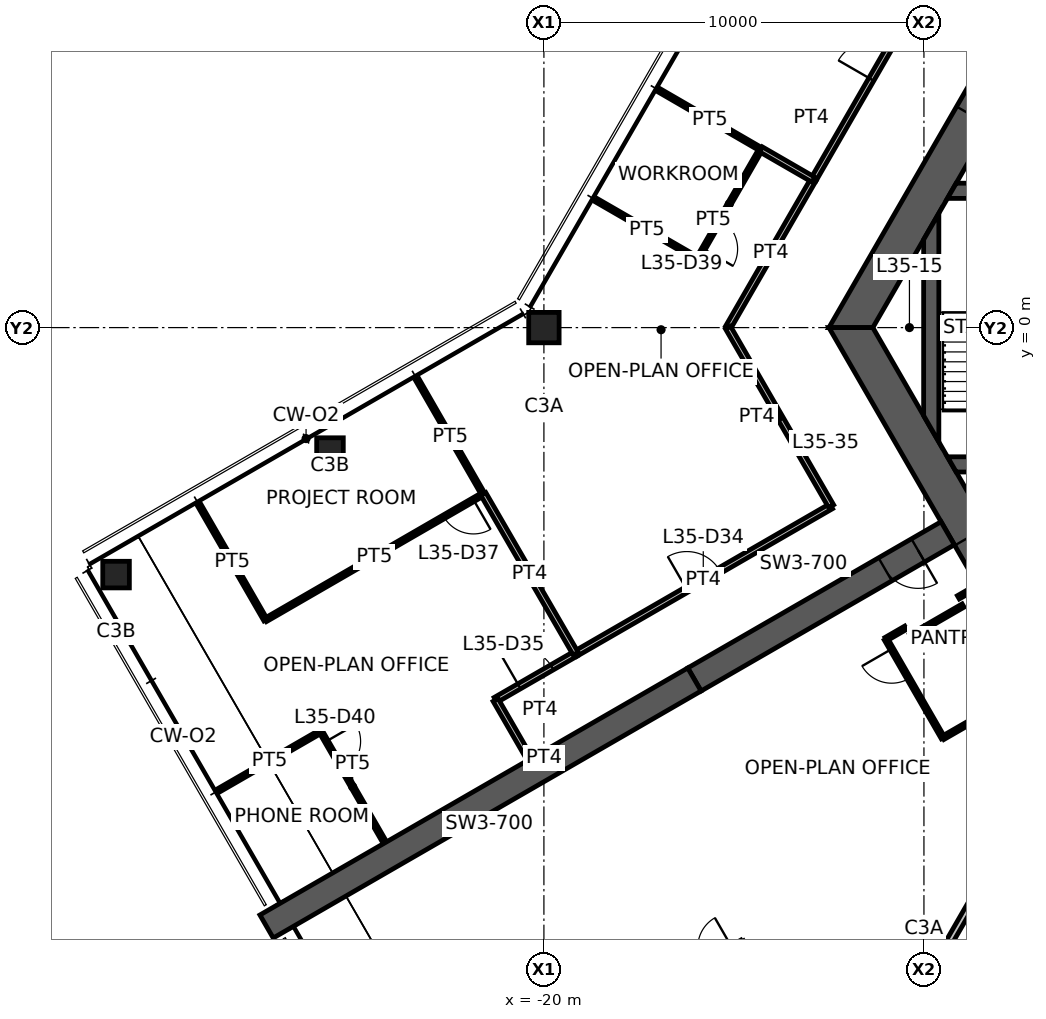
"""IFC4 building model, lengths in metres.
Left out: names, types, materials, properties, quantities, classifications, styles, units other than length and angle.
Written with IfcOpenShell. Run it as: python <this file> out.ifc"""

import sys

from ifc_helpers import new_model, si_unit, direction, frame, frame_2d, origin, origin_2d, place, context, subcontext, project, spatial, polyline, rectangle, hollow_rectangle, outline, extrude, element, fill, save


model = new_model("IFC4")
c1 = context("Model", 3, precision=1e-05, world=origin(), true_north=direction((0.0, 1.0)))
c2 = subcontext(c1, "Body", "Model", "MODEL_VIEW")
j1 = project(units=[si_unit("LENGTHUNIT", "METRE"), si_unit("PLANEANGLEUNIT", "RADIAN")], contexts=[c1])
p1 = place(None, origin())
s1 = spatial("IfcSite", under=j1, at=p1, CompositionType="ELEMENT")
p2 = place(p1, origin())
s2 = spatial("IfcBuilding", under=s1, at=p2, CompositionType="ELEMENT")
p3 = place(p2, frame((0.0, 0.0, 140.9)))
s3 = spatial("IfcBuildingStorey", under=s2, at=p3, CompositionType="ELEMENT", Elevation=140.9)
p4 = place(p3, frame((-20.0, 0.0, 0.0), z_axis=(0.0, 0.0, 1.0), x_axis=(1.0, 0.0, 0.0)))
e1 = element("IfcColumn", 1, at=p4, inside=s3, PredefinedType="COLUMN", context=c2, shape_type="SweptSolid", body=[
    extrude(hollow_rectangle(XDim=0.8, YDim=0.8, WallThickness=0.045, at=origin_2d()), origin(), (0.0, 0.0, 1.0), 3.9),
])
for number, where, z_axis, x_axis in (
    (2, (-25.629, -3.25, 0.0), (0.0, 0.0, 1.0), (1.0, 0.0, 0.0)),
    (3, (-31.258, -6.5, 0.0), (0.0, 0.0, 1.0), (1.0, 0.0, 0.0)),
):
    element("IfcColumn", number, at=place(p3, frame(where, z_axis=z_axis, x_axis=x_axis)), inside=s3, PredefinedType="COLUMN", context=c2, shape_type="SweptSolid", body=[
        extrude(hollow_rectangle(XDim=0.7, YDim=0.7, WallThickness=0.036, at=origin_2d()), origin(), (0.0, 0.0, 1.0), 3.9),
    ])
p5 = place(p3, frame((-5.961, 10.325, 0.0), z_axis=(0.0, 0.0, 1.0), x_axis=(-0.500004296715, -0.866022923061, 0.0)))
e4 = element("IfcWall", 4, at=p5, inside=s3, PredefinedType="SHEAR", context=c2, shape_type="SweptSolid", body=[
    extrude(outline(polyline([(-0.289, -0.5), (4.494, -0.5), (5.494, -0.5), (12.211, -0.5), (11.634, 0.5), (5.494, 0.5), (4.494, 0.5), (0.289, 0.5), (-0.289, -0.5)])), origin(), (0.0, 0.0, 1.0), 3.9),
])
p6 = place(p5, frame((4.494, 0.0, 0.0)))
e5 = element("IfcOpeningElement", 5, at=p6, cuts=e4, PredefinedType="OPENING", context=c2, shape_type="SweptSolid", body=[
    extrude(rectangle(XDim=1.0, YDim=2.1, at=frame_2d((0.5, 1.05))), frame((0.0, 0.51, 0.0), z_axis=(0.0, -1.0, 0.0), x_axis=(1.0, 0.0, 0.0)), (0.0, 0.0, 1.0), 1.02),
])
p7 = place(p3, frame((-11.922, 0.0, 0.0), z_axis=(0.0, 0.0, 1.0), x_axis=(0.500004296715, -0.866022923061, 0.0)))
e6 = element("IfcWall", 6, at=p7, inside=s3, PredefinedType="SHEAR", context=c2, shape_type="SweptSolid", body=[
    extrude(outline(polyline([(-0.289, -0.5), (6.331, -0.5), (7.131, -0.5), (12.211, -0.5), (11.634, 0.5), (7.131, 0.5), (6.331, 0.5), (0.289, 0.5), (-0.289, -0.5)])), origin(), (0.0, 0.0, 1.0), 3.9),
])
p8 = place(p7, frame((6.331, 0.0, 0.0)))
e7 = element("IfcOpeningElement", 7, at=p8, cuts=e6, PredefinedType="OPENING", context=c2, shape_type="SweptSolid", body=[
    extrude(rectangle(XDim=0.8, YDim=2.1, at=frame_2d((0.4, 1.05))), frame((0.0, 0.51, 0.0), z_axis=(0.0, -1.0, 0.0), x_axis=(1.0, 0.0, 0.0)), (0.0, 0.0, 1.0), 1.02),
])
p9 = place(p3, frame((-9.375, -5.413, 0.0), z_axis=(0.0, 0.0, 1.0), x_axis=(-0.866032377459, -0.499987921047, 0.0)))
e8 = element("IfcWall", 8, at=p9, inside=s3, PredefinedType="SHEAR", context=c2, shape_type="SweptSolid", body=[
    extrude(rectangle(XDim=7.696, YDim=0.7, at=frame_2d((3.848, 0.0))), origin(), (0.0, 0.0, 1.0), 3.9),
])
p10 = place(p9, frame((0.9, 0.0, 0.0)))
e9 = element("IfcOpeningElement", 9, at=p10, cuts=e8, PredefinedType="OPENING", context=c2, shape_type="SweptSolid", body=[
    extrude(rectangle(XDim=1.0, YDim=2.1, at=frame_2d((0.5, 1.05))), frame((0.0, 0.36, 0.0), z_axis=(0.0, -1.0, 0.0), x_axis=(1.0, 0.0, 0.0)), (0.0, 0.0, 1.0), 0.72),
])
p11 = place(p3, frame((-16.039, -9.26, 0.0), z_axis=(0.0, 0.0, 1.0), x_axis=(-0.866024837091, -0.50000098154, 0.0)))
e10 = element("IfcWall", 10, at=p11, inside=s3, PredefinedType="SHEAR", context=c2, shape_type="SweptSolid", body=[
    extrude(rectangle(XDim=13.0, YDim=0.7, at=frame_2d((6.5, 0.0))), origin(), (0.0, 0.0, 1.0), 3.9),
])
p12 = place(p3, frame((-9.266, 3.6, 0.0), z_axis=(0.0, 0.0, 1.0), x_axis=(1.0, 0.0, 0.0)))
e11 = element("IfcWall", 11, at=p12, inside=s3, PredefinedType="SHEAR", context=c2, shape_type="SweptSolid", body=[
    extrude(outline(polyline([(-0.115, -0.2), (3.266, -0.2), (4.266, -0.2), (5.667, -0.2), (6.767, -0.2), (7.866, -0.2), (7.866, 0.2), (6.767, 0.2), (5.667, 0.2), (4.266, 0.2), (3.266, 0.2), (0.115, 0.2), (-0.115, -0.2)])), origin(), (0.0, 0.0, 1.0), 3.9),
])
p13 = place(p12, frame((3.266, 0.0, 0.0)))
e12 = element("IfcOpeningElement", 12, at=p13, cuts=e11, PredefinedType="OPENING", context=c2, shape_type="SweptSolid", body=[
    extrude(rectangle(XDim=1.0, YDim=2.1, at=frame_2d((0.5, 1.05))), frame((0.0, 0.21, 0.0), z_axis=(0.0, -1.0, 0.0), x_axis=(1.0, 0.0, 0.0)), (0.0, 0.0, 1.0), 0.42),
])
p14 = place(p12, frame((5.667, 0.0, 0.0)))
e13 = element("IfcOpeningElement", 13, at=p14, cuts=e11, PredefinedType="OPENING", context=c2, shape_type="SweptSolid", body=[
    extrude(rectangle(XDim=1.1, YDim=2.1, at=frame_2d((0.55, 1.05))), frame((0.0, 0.21, 0.0), z_axis=(0.0, -1.0, 0.0), x_axis=(1.0, 0.0, 0.0)), (0.0, 0.0, 1.0), 0.42),
])
p15 = place(p3, frame((-9.266, -3.6, 0.0), z_axis=(0.0, 0.0, 1.0), x_axis=(1.0, 0.0, 0.0)))
e14 = element("IfcWall", 14, at=p15, inside=s3, PredefinedType="SHEAR", context=c2, shape_type="SweptSolid", body=[
    extrude(outline(polyline([(0.115, -0.2), (3.116, -0.2), (4.417, -0.2), (5.667, -0.2), (6.767, -0.2), (7.866, -0.2), (7.866, 0.2), (6.767, 0.2), (5.667, 0.2), (4.417, 0.2), (3.116, 0.2), (-0.115, 0.2), (0.115, -0.2)])), origin(), (0.0, 0.0, 1.0), 3.9),
])
p16 = place(p15, frame((5.667, 0.0, 0.0)))
e15 = element("IfcOpeningElement", 15, at=p16, cuts=e14, PredefinedType="OPENING", context=c2, shape_type="SweptSolid", body=[
    extrude(rectangle(XDim=1.1, YDim=2.1, at=frame_2d((0.55, 1.05))), frame((0.0, 0.21, 0.0), z_axis=(0.0, -1.0, 0.0), x_axis=(1.0, 0.0, 0.0)), (0.0, 0.0, 1.0), 0.42),
])
p17 = place(p15, frame((3.116, 0.0, 0.0)))
e16 = element("IfcOpeningElement", 16, at=p17, cuts=e14, PredefinedType="OPENING", context=c2, shape_type="SweptSolid", body=[
    extrude(rectangle(XDim=1.3, YDim=2.1, at=frame_2d((0.65, 1.05))), frame((0.0, 0.21, 0.0), z_axis=(0.0, -1.0, 0.0), x_axis=(1.0, 0.0, 0.0)), (0.0, 0.0, 1.0), 0.42),
])
p18 = place(p3, frame((-9.808, -2.662, 0.0), z_axis=(0.0, 0.0, 1.0), x_axis=(0.0, 1.0, 0.0)))
e17 = element("IfcWall", 17, at=p18, inside=s3, PredefinedType="SHEAR", context=c2, shape_type="SweptSolid", body=[
    extrude(outline(polyline([(-0.346, -0.2), (5.671, -0.2), (4.978, 0.2), (0.346, 0.2), (-0.346, -0.2)])), origin(), (0.0, 0.0, 1.0), 3.9),
])
p19 = place(p3, frame((-6.035, -10.453, 0.0), z_axis=(0.0, 0.0, 1.0), x_axis=(-0.499989830942, -0.866031274813, 0.0)))
e18 = element("IfcWall", 18, at=p19, inside=s3, PredefinedType="PARTITIONING", context=c2, shape_type="SweptSolid", body=[
    extrude(rectangle(XDim=7.93, YDim=0.175, at=frame_2d((3.965, 0.0))), origin(), (0.0, 0.0, 1.0), 3.05),
])
p20 = place(p19, frame((1.13, 0.0, 0.0)))
e19 = element("IfcOpeningElement", 19, at=p20, cuts=e18, PredefinedType="OPENING", context=c2, shape_type="SweptSolid", body=[
    extrude(rectangle(XDim=1.0, YDim=2.1, at=frame_2d((0.5, 1.05))), frame((0.0, 0.098, 0.0), z_axis=(0.0, -1.0, 0.0), x_axis=(1.0, 0.0, 0.0)), (0.0, 0.0, 1.0), 0.195),
])
p21 = place(p3, frame((-19.171, -8.586, 0.0), z_axis=(0.0, 0.0, 1.0), x_axis=(0.866007176269, 0.500031569654, 0.0)))
e20 = element("IfcWall", 20, at=p21, inside=s3, PredefinedType="PARTITIONING", context=c2, shape_type="SweptSolid", body=[
    extrude(rectangle(XDim=7.771, YDim=0.15, at=frame_2d((3.885, 0.0))), origin(), (0.0, 0.0, 1.0), 2.95),
])
p22 = place(p21, frame((3.385, 0.0, 0.0)))
e21 = element("IfcOpeningElement", 21, at=p22, cuts=e20, PredefinedType="OPENING", context=c2, shape_type="SweptSolid", body=[
    extrude(rectangle(XDim=1.0, YDim=2.1, at=frame_2d((0.5, 1.05))), frame((0.0, 0.085, 0.0), z_axis=(0.0, -1.0, 0.0), x_axis=(1.0, 0.0, 0.0)), (0.0, 0.0, 1.0), 0.17),
])
p23 = place(p3, frame((-15.156, 0.0, 0.0), z_axis=(0.0, 0.0, 1.0), x_axis=(0.500014848696, 0.866016830716, 0.0)))
e22 = element("IfcWall", 22, at=p23, inside=s3, PredefinedType="PARTITIONING", context=c2, shape_type="SweptSolid", body=[
    extrude(rectangle(XDim=4.505, YDim=0.15, at=frame_2d((2.252, 0.0))), origin(), (0.0, 0.0, 1.0), 2.95),
])
p24 = place(p3, frame((-12.442, -4.7, 0.0), z_axis=(0.0, 0.0, 1.0), x_axis=(-0.500009286329, 0.866020042254, 0.0)))
e23 = element("IfcWall", 23, at=p24, inside=s3, PredefinedType="PARTITIONING", context=c2, shape_type="SweptSolid", body=[
    extrude(rectangle(XDim=5.428, YDim=0.15, at=frame_2d((2.714, 0.0))), origin(), (0.0, 0.0, 1.0), 2.95),
])
p25 = place(p3, frame((-21.271, -9.798, 0.0), z_axis=(0.0, 0.0, 1.0), x_axis=(0.866025270247, 0.500000231294, 0.0)))
e24 = element("IfcWall", 24, at=p25, inside=s3, PredefinedType="PARTITIONING", context=c2, shape_type="SweptSolid", body=[
    extrude(rectangle(XDim=2.435, YDim=0.15, at=frame_2d((1.217, 0.0))), origin(), (0.0, 0.0, 1.0), 2.95),
])
p26 = place(p25, frame((0.717, 0.0, 0.0)))
e25 = element("IfcOpeningElement", 25, at=p26, cuts=e24, PredefinedType="OPENING", context=c2, shape_type="SweptSolid", body=[
    extrude(rectangle(XDim=1.0, YDim=2.1, at=frame_2d((0.5, 1.05))), frame((0.0, 0.085, 0.0), z_axis=(0.0, -1.0, 0.0), x_axis=(1.0, 0.0, 0.0)), (0.0, 0.0, 1.0), 0.17),
])
p27 = place(p3, frame((-20.381, -11.34, 0.0), z_axis=(0.0, 0.0, 1.0), x_axis=(-0.500062787734, 0.865989150234, 0.0)))
e26 = element("IfcWall", 26, at=p27, inside=s3, PredefinedType="PARTITIONING", context=c2, shape_type="SweptSolid", body=[
    extrude(rectangle(XDim=1.78, YDim=0.15, at=frame_2d((0.89, 0.0))), origin(), (0.0, 0.0, 1.0), 2.95),
])
p28 = place(p3, frame((-12.908, 3.893, 0.0), z_axis=(0.0, 0.0, 1.0), x_axis=(0.500006411147, 0.866021702275, 0.0)))
e27 = element("IfcWall", 27, at=p28, inside=s3, PredefinedType="PARTITIONING", context=c2, shape_type="SweptSolid", body=[
    extrude(rectangle(XDim=7.095, YDim=0.15, at=frame_2d((3.548, 0.0))), origin(), (0.0, 0.0, 1.0), 2.95),
])
p29 = place(p28, frame((3.047, 0.0, 0.0)))
e28 = element("IfcOpeningElement", 28, at=p29, cuts=e27, PredefinedType="OPENING", context=c2, shape_type="SweptSolid", body=[
    extrude(rectangle(XDim=1.0, YDim=2.1, at=frame_2d((0.5, 1.05))), frame((0.0, 0.085, 0.0), z_axis=(0.0, -1.0, 0.0), x_axis=(1.0, 0.0, 0.0)), (0.0, 0.0, 1.0), 0.17),
])
p30 = place(p3, frame((-23.332, -1.37, 0.0), z_axis=(0.0, 0.0, 1.0), x_axis=(0.498863855434, -0.86668036423, 0.0)))
e29 = element("IfcWall", 29, at=p30, inside=s3, PredefinedType="PARTITIONING", context=c2, shape_type="SweptSolid", body=[
    extrude(rectangle(XDim=3.48, YDim=0.1, at=frame_2d((1.74, 0.0))), origin(), (0.0, 0.0, 1.0), 2.95),
])
p31 = place(p3, frame((-27.325, -7.693, 0.0), z_axis=(0.0, 0.0, 1.0), x_axis=(-0.499989765943, 0.866031312339, 0.0)))
e30 = element("IfcWall", 30, at=p31, inside=s3, PredefinedType="PARTITIONING", context=c2, shape_type="SweptSolid", body=[
    extrude(rectangle(XDim=3.505, YDim=0.1, at=frame_2d((1.752, 0.0))), origin(), (0.0, 0.0, 1.0), 2.95),
])
p32 = place(p3, frame((-21.594, -4.379, 0.0), z_axis=(0.0, 0.0, 1.0), x_axis=(-0.865682888643, -0.500592784916, 0.0)))
e31 = element("IfcWall", 31, at=p32, inside=s3, PredefinedType="PARTITIONING", context=c2, shape_type="SweptSolid", body=[
    extrude(rectangle(XDim=6.62, YDim=0.1, at=frame_2d((3.31, 0.0))), origin(), (0.0, 0.0, 1.0), 2.95),
])
p33 = place(p32, frame((0.3, 0.0, 0.0)))
e32 = element("IfcOpeningElement", 32, at=p33, cuts=e31, PredefinedType="OPENING", context=c2, shape_type="SweptSolid", body=[
    extrude(rectangle(XDim=0.9, YDim=2.1, at=frame_2d((0.45, 1.05))), frame((0.0, 0.06, 0.0), z_axis=(0.0, -1.0, 0.0), x_axis=(1.0, 0.0, 0.0)), (0.0, 0.0, 1.0), 0.12),
])
p34 = place(p3, frame((-15.952, 1.811, 0.0), z_axis=(0.0, 0.0, 1.0), x_axis=(-0.866029832698, 0.499992328818, 0.0)))
e33 = element("IfcWall", 33, at=p34, inside=s3, PredefinedType="PARTITIONING", context=c2, shape_type="SweptSolid", body=[
    extrude(rectangle(XDim=3.08, YDim=0.1, at=frame_2d((1.54, 0.0))), origin(), (0.0, 0.0, 1.0), 2.95),
])
p35 = place(p3, frame((-14.291, 4.698, 0.0), z_axis=(0.0, 0.0, 1.0), x_axis=(-0.498780940327, -0.866728085138, 0.0)))
e34 = element("IfcWall", 34, at=p35, inside=s3, PredefinedType="PARTITIONING", context=c2, shape_type="SweptSolid", body=[
    extrude(rectangle(XDim=3.331, YDim=0.1, at=frame_2d((1.666, 0.0))), origin(), (0.0, 0.0, 1.0), 2.95),
])
p36 = place(p35, frame((2.131, 0.0, 0.0)))
e35 = element("IfcOpeningElement", 35, at=p36, cuts=e34, PredefinedType="OPENING", context=c2, shape_type="SweptSolid", body=[
    extrude(rectangle(XDim=0.9, YDim=2.1, at=frame_2d((0.45, 1.05))), frame((0.0, 0.06, 0.0), z_axis=(0.0, -1.0, 0.0), x_axis=(1.0, 0.0, 0.0)), (0.0, 0.0, 1.0), 0.12),
])
for number, where, z_axis, x_axis in (
    (36, (-16.976, 6.248, 0.0), (0.0, 0.0, 1.0), (0.865, -0.501, 0.0)),
    (37, (-28.562, -12.18, 0.0), (0.0, 0.0, 1.0), (0.866, 0.5, 0.0)),
):
    element("IfcWall", number, at=place(p3, frame(where, z_axis=z_axis, x_axis=x_axis)), inside=s3, PredefinedType="PARTITIONING", context=c2, shape_type="SweptSolid", body=[
        extrude(rectangle(XDim=3.105, YDim=0.1, at=frame_2d((1.553, 0.0))), origin(), (0.0, 0.0, 1.0), 2.95),
    ])
p37 = place(p3, frame((-25.873, -10.627, 0.0), z_axis=(0.0, 0.0, 1.0), x_axis=(0.5000115033, -0.866018762249, 0.0)))
e38 = element("IfcWall", 38, at=p37, inside=s3, PredefinedType="PARTITIONING", context=c2, shape_type="SweptSolid", body=[
    extrude(rectangle(XDim=3.363, YDim=0.1, at=frame_2d((1.682, 0.0))), origin(), (0.0, 0.0, 1.0), 2.95),
])
p38 = place(p37, frame((0.3, 0.0, 0.0)))
e39 = element("IfcOpeningElement", 39, at=p38, cuts=e38, PredefinedType="OPENING", context=c2, shape_type="SweptSolid", body=[
    extrude(rectangle(XDim=0.9, YDim=2.1, at=frame_2d((0.45, 1.05))), frame((0.0, 0.06, 0.0), z_axis=(0.0, -1.0, 0.0), x_axis=(1.0, 0.0, 0.0)), (0.0, 0.0, 1.0), 0.12),
])
p39 = place(p3, frame((-19.163, -8.581, 0.0), z_axis=(0.0, 0.0, 1.0), x_axis=(-0.500843945189, 0.865537603209, 0.0)))
e40 = element("IfcWall", 40, at=p39, inside=s3, PredefinedType="PARTITIONING", context=c2, shape_type="SweptSolid", body=[
    extrude(rectangle(XDim=4.854, YDim=0.15, at=frame_2d((2.427, 0.0))), origin(), (0.0, 0.0, 1.0), 2.95),
])
p40 = place(p3, frame((-14.289, 4.691, 0.0), z_axis=(0.0, 0.0, 1.0), x_axis=(0.865925490132, -0.500173015605, 0.0)))
e41 = element("IfcWall", 41, at=p40, inside=s3, PredefinedType="PARTITIONING", context=c2, shape_type="SweptSolid", body=[
    extrude(rectangle(XDim=1.595, YDim=0.15, at=frame_2d((0.797, 0.0))), origin(), (0.0, 0.0, 1.0), 2.95),
])
p41 = place(p3, frame((-11.0, -8.198, 0.0), z_axis=(0.0, 0.0, 1.0), x_axis=(0.866131372301, 0.499816412211, 0.0)))
e42 = element("IfcWall", 42, at=p41, inside=s3, PredefinedType="PARTITIONING", context=c2, shape_type="SweptSolid", body=[
    extrude(rectangle(XDim=0.6, YDim=0.1, at=frame_2d((0.3, 0.0))), origin(), (0.0, 0.0, 1.0), 2.95),
])
p42 = place(p3, frame((-10.355, -8.115, 0.0), z_axis=(0.0, 0.0, 1.0), x_axis=(0.866094119867, 0.499880961361, 0.0)))
e43 = element("IfcWall", 43, at=p42, inside=s3, PredefinedType="PARTITIONING", context=c2, shape_type="SweptSolid", body=[
    extrude(rectangle(XDim=1.6, YDim=0.1, at=frame_2d((0.8, 0.0))), origin(), (0.0, 0.0, 1.0), 2.95),
])
p43 = place(p3, frame((-9.5, -10.796, 0.0), z_axis=(0.0, 0.0, 1.0), x_axis=(-0.499990139034, 0.866031096941, 0.0)))
e44 = element("IfcWall", 44, at=p43, inside=s3, PredefinedType="PARTITIONING", context=c2, shape_type="SweptSolid", body=[
    extrude(rectangle(XDim=3.0, YDim=0.1, at=frame_2d((1.5, 0.0))), origin(), (0.0, 0.0, 1.0), 2.95),
])
p44 = place(p43, frame((1.8, 0.0, 0.0)))
e45 = element("IfcOpeningElement", 45, at=p44, cuts=e44, PredefinedType="OPENING", context=c2, shape_type="SweptSolid", body=[
    extrude(rectangle(XDim=0.9, YDim=2.1, at=frame_2d((0.45, 1.05))), frame((0.0, 0.06, 0.0), z_axis=(0.0, -1.0, 0.0), x_axis=(1.0, 0.0, 0.0)), (0.0, 0.0, 1.0), 0.12),
])
p45 = place(p3, frame((-9.094, -7.098, 0.0), z_axis=(0.0, 0.0, 1.0), x_axis=(0.865954211699, 0.50012328804, 0.0)))
e46 = element("IfcWall", 46, at=p45, inside=s3, PredefinedType="PARTITIONING", context=c2, shape_type="SweptSolid", body=[
    extrude(rectangle(XDim=0.58, YDim=0.1, at=frame_2d((0.29, 0.0))), origin(), (0.0, 0.0, 1.0), 2.95),
])
p46 = place(p3, frame((-7.092, -9.406, 0.0), z_axis=(0.0, 0.0, 1.0), x_axis=(-0.86603494908, -0.499983466698, 0.0)))
e47 = element("IfcWall", 47, at=p46, inside=s3, PredefinedType="PARTITIONING", context=c2, shape_type="SweptSolid", body=[
    extrude(rectangle(XDim=2.78, YDim=0.1, at=frame_2d((1.39, 0.0))), origin(), (0.0, 0.0, 1.0), 2.95),
])
p47 = place(p10, origin())
e48 = element("IfcDoor", 48, at=p47, inside=s3, OperationType="SINGLE_SWING_LEFT", PredefinedType="DOOR", context=c2, shape_type="SweptSolid", body=[
    extrude(rectangle(XDim=1.0, YDim=2.1, at=frame_2d((0.5, 1.05))), frame((0.0, 0.025, 0.0), z_axis=(0.0, -1.0, 0.0), x_axis=(1.0, 0.0, 0.0)), (0.0, 0.0, 1.0), 0.05),
])
fill(e9, e48)
p48 = place(p22, origin())
e49 = element("IfcDoor", 49, at=p48, inside=s3, OperationType="SINGLE_SWING_LEFT", PredefinedType="DOOR", context=c2, shape_type="SweptSolid", body=[
    extrude(rectangle(XDim=1.0, YDim=2.1, at=frame_2d((0.5, 1.05))), frame((0.0, 0.025, 0.0), z_axis=(0.0, -1.0, 0.0), x_axis=(1.0, 0.0, 0.0)), (0.0, 0.0, 1.0), 0.05),
])
fill(e21, e49)
p49 = place(p26, origin())
e50 = element("IfcDoor", 50, at=p49, inside=s3, OperationType="SINGLE_SWING_LEFT", PredefinedType="DOOR", context=c2, shape_type="SweptSolid", body=[
    extrude(rectangle(XDim=1.0, YDim=2.1, at=frame_2d((0.5, 1.05))), frame((0.0, 0.025, 0.0), z_axis=(0.0, -1.0, 0.0), x_axis=(1.0, 0.0, 0.0)), (0.0, 0.0, 1.0), 0.05),
])
fill(e25, e50)
p50 = place(p29, origin())
e51 = element("IfcDoor", 51, at=p50, inside=s3, OperationType="SINGLE_SWING_LEFT", PredefinedType="DOOR", context=c2, shape_type="SweptSolid", body=[
    extrude(rectangle(XDim=1.0, YDim=2.1, at=frame_2d((0.5, 1.05))), frame((0.0, 0.025, 0.0), z_axis=(0.0, -1.0, 0.0), x_axis=(1.0, 0.0, 0.0)), (0.0, 0.0, 1.0), 0.05),
])
fill(e28, e51)
p51 = place(p33, origin())
e52 = element("IfcDoor", 52, at=p51, inside=s3, OperationType="SINGLE_SWING_LEFT", PredefinedType="DOOR", context=c2, shape_type="SweptSolid", body=[
    extrude(rectangle(XDim=0.9, YDim=2.1, at=frame_2d((0.45, 1.05))), frame((0.0, 0.025, 0.0), z_axis=(0.0, -1.0, 0.0), x_axis=(1.0, 0.0, 0.0)), (0.0, 0.0, 1.0), 0.05),
])
fill(e32, e52)
p52 = place(p36, origin())
e53 = element("IfcDoor", 53, at=p52, inside=s3, OperationType="SINGLE_SWING_RIGHT", PredefinedType="DOOR", context=c2, shape_type="SweptSolid", body=[
    extrude(rectangle(XDim=0.9, YDim=2.1, at=frame_2d((0.45, 1.05))), frame((0.0, 0.025, 0.0), z_axis=(0.0, -1.0, 0.0), x_axis=(1.0, 0.0, 0.0)), (0.0, 0.0, 1.0), 0.05),
])
fill(e35, e53)
p53 = place(p38, origin())
e54 = element("IfcDoor", 54, at=p53, inside=s3, OperationType="SINGLE_SWING_LEFT", PredefinedType="DOOR", context=c2, shape_type="SweptSolid", body=[
    extrude(rectangle(XDim=0.9, YDim=2.1, at=frame_2d((0.45, 1.05))), frame((0.0, 0.025, 0.0), z_axis=(0.0, -1.0, 0.0), x_axis=(1.0, 0.0, 0.0)), (0.0, 0.0, 1.0), 0.05),
])
fill(e39, e54)
p54 = place(p44, origin())
e55 = element("IfcDoor", 55, at=p54, inside=s3, OperationType="SINGLE_SWING_RIGHT", PredefinedType="DOOR", context=c2, shape_type="SweptSolid", body=[
    extrude(rectangle(XDim=0.9, YDim=2.1, at=frame_2d((0.45, 1.05))), frame((0.0, 0.025, 0.0), z_axis=(0.0, -1.0, 0.0), x_axis=(1.0, 0.0, 0.0)), (0.0, 0.0, 1.0), 0.05),
])
fill(e45, e55)
save(model, sys.argv[1])
